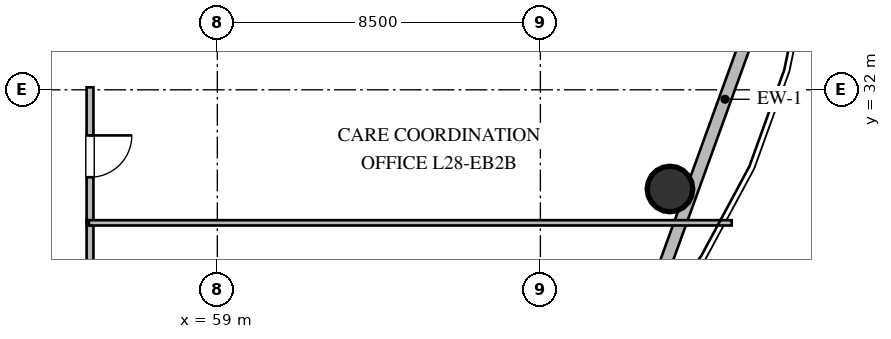
"""IFC4 building model, lengths in metres.
Left out: names, types, materials, properties, quantities, classifications, styles, units other than length and angle.
Written with IfcOpenShell. Run it as: python <this file> out.ifc"""

import sys

from ifc_helpers import new_model, si_unit, direction, frame, frame_2d, origin, origin_2d, place, context, subcontext, project, spatial, rectangle, circle, extrude, element, fill, save


model = new_model("IFC4")
c1 = context("Model", 3, precision=1e-05, world=origin(), true_north=direction((0.0, 1.0)))
c2 = subcontext(c1, "Body", "Model", "MODEL_VIEW")
j1 = project(units=[si_unit("LENGTHUNIT", "METRE"), si_unit("PLANEANGLEUNIT", "RADIAN")], contexts=[c1])
p1 = place(None, origin())
s1 = spatial("IfcSite", under=j1, at=p1, CompositionType="ELEMENT")
p2 = place(p1, origin())
s2 = spatial("IfcBuilding", under=s1, at=p2, CompositionType="ELEMENT")
p3 = place(p2, frame((0.0, 0.0, 109.8)))
s3 = spatial("IfcBuildingStorey", under=s2, at=p3, CompositionType="ELEMENT", Elevation=109.8)
p4 = place(p3, frame((70.91, 29.39, 0.0), z_axis=(0.0, 0.0, 1.0), x_axis=(1.0, 0.0, 0.0)))
e1 = element("IfcColumn", 1, at=p4, inside=s3, PredefinedType="COLUMN", context=c2, shape_type="SweptSolid", body=[
    extrude(circle(Radius=0.6, at=origin_2d()), origin(), (0.0, 0.0, 1.0), 3.6),
])
p5 = place(p3, frame((74.708, 38.244, 0.0), z_axis=(0.0, 0.0, 1.0), x_axis=(-0.340324669139, -0.94030799187, 0.0)))
e2 = element("IfcWall", 2, at=p5, inside=s3, PredefinedType="STANDARD", context=c2, shape_type="SweptSolid", body=[
    extrude(rectangle(XDim=13.81, YDim=0.32, at=frame_2d((6.905, 0.0))), origin(), (0.0, 0.0, 1.0), 3.36),
])
p6 = place(p3, frame((55.65, 28.565, 0.0), z_axis=(0.0, 0.0, 1.0), x_axis=(0.0, -1.0, 0.0)))
e3 = element("IfcWall", 3, at=p6, inside=s3, PredefinedType="PARTITIONING", context=c2, shape_type="SweptSolid", body=[
    extrude(rectangle(XDim=3.63, YDim=0.18, at=frame_2d((1.815, 0.0))), origin(), (0.0, 0.0, 1.0), 3.36),
])
p7 = place(p6, frame((1.265, 0.0, 0.0)))
e4 = element("IfcOpeningElement", 4, at=p7, cuts=e3, PredefinedType="OPENING", context=c2, shape_type="SweptSolid", body=[
    extrude(rectangle(XDim=1.1, YDim=2.1, at=frame_2d((0.55, 1.05))), frame((0.0, 0.1, 0.0), z_axis=(0.0, -1.0, 0.0), x_axis=(1.0, 0.0, 0.0)), (0.0, 0.0, 1.0), 0.2),
])
p8 = place(p3, frame((55.65, 32.065, 0.0), z_axis=(0.0, 0.0, 1.0), x_axis=(0.0, -1.0, 0.0)))
e5 = element("IfcWall", 5, at=p8, inside=s3, PredefinedType="PARTITIONING", context=c2, shape_type="SweptSolid", body=[
    extrude(rectangle(XDim=3.63, YDim=0.18, at=frame_2d((1.815, 0.0))), origin(), (0.0, 0.0, 1.0), 3.36),
])
p9 = place(p8, frame((1.265, 0.0, 0.0)))
e6 = element("IfcOpeningElement", 6, at=p9, cuts=e5, PredefinedType="OPENING", context=c2, shape_type="SweptSolid", body=[
    extrude(rectangle(XDim=1.1, YDim=2.1, at=frame_2d((0.55, 1.05))), frame((0.0, 0.1, 0.0), z_axis=(0.0, -1.0, 0.0), x_axis=(1.0, 0.0, 0.0)), (0.0, 0.0, 1.0), 0.2),
])
p10 = place(p3, frame((55.62, 28.5, 0.0), z_axis=(0.0, 0.0, 1.0), x_axis=(1.0, 0.0, 0.0)))
e7 = element("IfcWall", 7, at=p10, inside=s3, PredefinedType="PARTITIONING", context=c2, shape_type="SweptSolid", body=[
    extrude(rectangle(XDim=16.915, YDim=0.14, at=frame_2d((8.458, 0.0))), origin(), (0.0, 0.0, 1.0), 2.806),
])
p11 = place(p9, origin())
e8 = element("IfcDoor", 8, at=p11, inside=s3, OperationType="SINGLE_SWING_LEFT", PredefinedType="DOOR", context=c2, shape_type="SweptSolid", body=[
    extrude(rectangle(XDim=1.1, YDim=2.1, at=frame_2d((0.55, 1.05))), frame((0.0, 0.025, 0.0), z_axis=(0.0, -1.0, 0.0), x_axis=(1.0, 0.0, 0.0)), (0.0, 0.0, 1.0), 0.05),
])
fill(e6, e8)
save(model, sys.argv[1])
